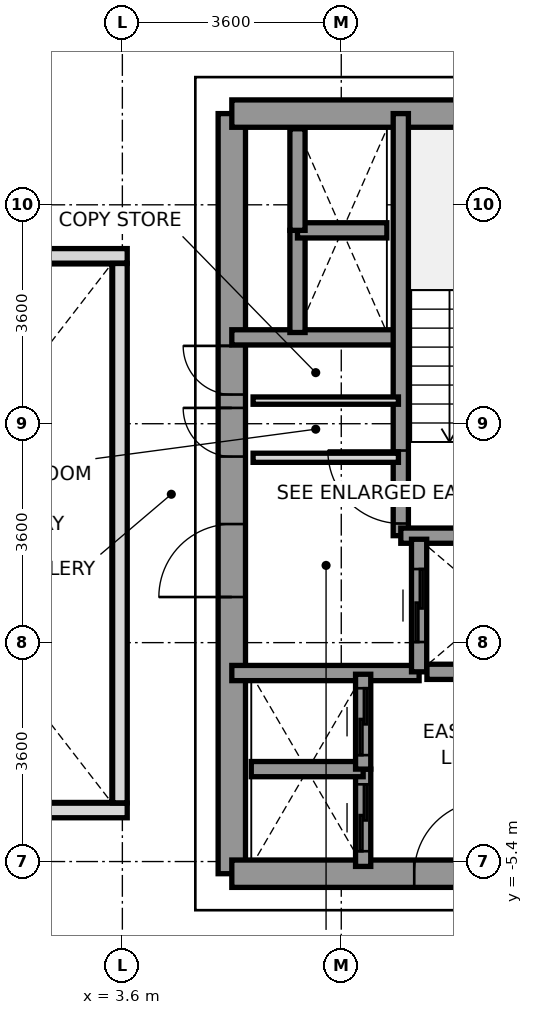
"""IFC4 building model, lengths in metres.
Left out: names, types, materials, properties, quantities, classifications, styles, units other than length and angle.
Written with IfcOpenShell. Run it as: python <this file> out.ifc"""

import sys

from ifc_helpers import new_model, si_unit, direction, frame, frame_2d, origin, place, context, subcontext, project, spatial, rectangle, extrude, source, transform, mapped, element, fill, save


model = new_model("IFC4")
c1 = context("Model", 3, precision=1e-05, world=origin(), true_north=direction((0.0, 1.0)))
c2 = subcontext(c1, "Body", "Model", "MODEL_VIEW")
j1 = project(units=[si_unit("LENGTHUNIT", "METRE"), si_unit("PLANEANGLEUNIT", "RADIAN")], contexts=[c1])
p1 = place(None, origin())
s1 = spatial("IfcSite", under=j1, at=p1, CompositionType="ELEMENT")
p2 = place(p1, origin())
s2 = spatial("IfcBuilding", under=s1, at=p2, CompositionType="ELEMENT")
p3 = place(p2, frame((0.0, 0.0, 124.4)))
s3 = spatial("IfcBuildingStorey", under=s2, at=p3, CompositionType="ELEMENT", Elevation=124.4)
p4 = place(p3, frame((5.4, -5.6, 0.0), z_axis=(0.0, 0.0, 1.0), x_axis=(0.0, 1.0, 0.0)))
e1 = element("IfcWall", 1, at=p4, inside=s3, PredefinedType="SHEAR", context=c2, shape_type="SweptSolid", body=[
    extrude(rectangle(XDim=12.5, YDim=0.45, at=frame_2d((6.25, 0.0))), origin(), (0.0, 0.0, 1.0), 3.2),
])
p5 = place(p4, frame((4.55, 0.0, 0.0)))
e2 = element("IfcOpeningElement", 2, at=p5, cuts=e1, PredefinedType="OPENING", context=c2, shape_type="SweptSolid", body=[
    extrude(rectangle(XDim=1.2, YDim=2.2, at=frame_2d((0.6, 1.1))), frame((0.0, 0.235, 0.0), z_axis=(0.0, -1.0, 0.0), x_axis=(1.0, 0.0, 0.0)), (0.0, 0.0, 1.0), 0.47),
])
p6 = place(p4, frame((6.86, 0.0, 0.0)))
e3 = element("IfcOpeningElement", 3, at=p6, cuts=e1, PredefinedType="OPENING", context=c2, shape_type="SweptSolid", body=[
    extrude(rectangle(XDim=0.8, YDim=2.1, at=frame_2d((0.4, 1.05))), frame((0.0, 0.235, 0.0), z_axis=(0.0, -1.0, 0.0), x_axis=(1.0, 0.0, 0.0)), (0.0, 0.0, 1.0), 0.47),
])
p7 = place(p4, frame((7.88, 0.0, 0.0)))
e4 = element("IfcOpeningElement", 4, at=p7, cuts=e1, PredefinedType="OPENING", context=c2, shape_type="SweptSolid", body=[
    extrude(rectangle(XDim=0.8, YDim=2.1, at=frame_2d((0.4, 1.05))), frame((0.0, 0.235, 0.0), z_axis=(0.0, -1.0, 0.0), x_axis=(1.0, 0.0, 0.0)), (0.0, 0.0, 1.0), 0.47),
])
p8 = place(p3, frame((5.4, 6.9, 0.0), z_axis=(0.0, 0.0, 1.0), x_axis=(1.0, 0.0, 0.0)))
e5 = element("IfcWall", 5, at=p8, inside=s3, PredefinedType="SHEAR", context=c2, shape_type="SweptSolid", body=[
    extrude(rectangle(XDim=5.981, YDim=0.45, at=frame_2d((2.991, 0.0))), origin(), (0.0, 0.0, 1.0), 3.2),
])
p9 = place(p3, frame((5.4, -5.6, 0.0), z_axis=(0.0, 0.0, 1.0), x_axis=(1.0, 0.0, 0.0)))
e6 = element("IfcWall", 6, at=p9, inside=s3, PredefinedType="SHEAR", context=c2, shape_type="SweptSolid", body=[
    extrude(rectangle(XDim=7.8, YDim=0.45, at=frame_2d((3.9, 0.0))), origin(), (0.0, 0.0, 1.0), 3.2),
])
p10 = place(p9, frame((3.0, 0.0, 0.0)))
e7 = element("IfcOpeningElement", 7, at=p10, cuts=e6, PredefinedType="OPENING", context=c2, shape_type="SweptSolid", body=[
    extrude(rectangle(XDim=1.2, YDim=2.2, at=frame_2d((0.6, 1.1))), frame((0.0, 0.235, 0.0), z_axis=(0.0, -1.0, 0.0), x_axis=(1.0, 0.0, 0.0)), (0.0, 0.0, 1.0), 0.47),
])
p11 = place(p9, frame((5.85, 0.0, 0.0)))
e8 = element("IfcOpeningElement", 8, at=p11, cuts=e6, PredefinedType="OPENING", context=c2, shape_type="SweptSolid", body=[
    extrude(rectangle(XDim=0.8, YDim=2.1, at=frame_2d((0.4, 1.05))), frame((0.0, 0.235, 0.0), z_axis=(0.0, -1.0, 0.0), x_axis=(1.0, 0.0, 0.0)), (0.0, 0.0, 1.0), 0.47),
])
p12 = place(p3, frame((5.4, 3.22, 0.0), z_axis=(0.0, 0.0, 1.0), x_axis=(1.0, 0.0, 0.0)))
e9 = element("IfcWall", 9, at=p12, inside=s3, PredefinedType="SOLIDWALL", context=c2, shape_type="SweptSolid", body=[
    extrude(rectangle(XDim=2.78, YDim=0.25, at=frame_2d((1.39, 0.0))), origin(), (0.0, 0.0, 1.0), 3.2),
])
p13 = place(p3, frame((5.4, -2.3, 0.0), z_axis=(0.0, 0.0, 1.0), x_axis=(1.0, 0.0, 0.0)))
e10 = element("IfcWall", 10, at=p13, inside=s3, PredefinedType="SOLIDWALL", context=c2, shape_type="SweptSolid", body=[
    extrude(rectangle(XDim=3.08, YDim=0.25, at=frame_2d((1.54, 0.0))), origin(), (0.0, 0.0, 1.0), 3.2),
])
p14 = place(p3, frame((8.179, -0.041, 0.0), z_axis=(0.0, 0.0, 1.0), x_axis=(0.0, 1.0, 0.0)))
e11 = element("IfcWall", 11, at=p14, inside=s3, PredefinedType="SOLIDWALL", context=c2, shape_type="SweptSolid", body=[
    extrude(rectangle(XDim=6.941, YDim=0.25, at=frame_2d((3.47, 0.0))), origin(), (0.0, 0.0, 1.0), 3.2),
])
p15 = place(p14, frame((0.2, 0.0, 0.0)))
e12 = element("IfcOpeningElement", 12, at=p15, cuts=e11, PredefinedType="OPENING", context=c2, shape_type="SweptSolid", body=[
    extrude(rectangle(XDim=1.2, YDim=2.2, at=frame_2d((0.6, 1.1))), frame((0.0, 0.135, 0.0), z_axis=(0.0, -1.0, 0.0), x_axis=(1.0, 0.0, 0.0)), (0.0, 0.0, 1.0), 0.27),
])
p16 = place(p3, frame((8.179, -0.041, 0.0), z_axis=(0.0, 0.0, 1.0), x_axis=(1.0, 0.0, 0.0)))
e13 = element("IfcWall", 13, at=p16, inside=s3, PredefinedType="SOLIDWALL", context=c2, shape_type="SweptSolid", body=[
    extrude(rectangle(XDim=3.202, YDim=0.25, at=frame_2d((1.601, 0.0))), origin(), (0.0, 0.0, 1.0), 3.2),
])
p17 = place(p3, frame((8.48, -2.28, 0.0), z_axis=(0.0, 0.0, 1.0), x_axis=(0.0, 1.0, 0.0)))
e14 = element("IfcWall", 14, at=p17, inside=s3, PredefinedType="SOLIDWALL", context=c2, shape_type="SweptSolid", body=[
    extrude(rectangle(XDim=2.18, YDim=0.25, at=frame_2d((1.09, 0.0))), origin(), (0.0, 0.0, 1.0), 3.2),
])
p18 = place(p17, frame((0.49, 0.0, 0.0)))
e15 = element("IfcOpeningElement", 15, at=p18, cuts=e14, PredefinedType="OPENING", context=c2, shape_type="SweptSolid", body=[
    extrude(rectangle(XDim=1.2, YDim=2.2, at=frame_2d((0.6, 1.1))), frame((0.0, 0.135, 0.0), z_axis=(0.0, -1.0, 0.0), x_axis=(1.0, 0.0, 0.0)), (0.0, 0.0, 1.0), 0.27),
])
p19 = place(p3, frame((8.609, -2.28, 0.0), z_axis=(0.0, 0.0, 1.0), x_axis=(1.0, 0.0, 0.0)))
e16 = element("IfcWall", 16, at=p19, inside=s3, PredefinedType="SOLIDWALL", context=c2, shape_type="SweptSolid", body=[
    extrude(rectangle(XDim=2.312, YDim=0.25, at=frame_2d((1.156, 0.0))), origin(), (0.0, 0.0, 1.0), 3.2),
])
p20 = place(p3, frame((7.56, -5.48, 0.0), z_axis=(0.0, 0.0, 1.0), x_axis=(0.0, 1.0, 0.0)))
e17 = element("IfcWall", 17, at=p20, inside=s3, PredefinedType="SOLIDWALL", context=c2, shape_type="SweptSolid", body=[
    extrude(rectangle(XDim=1.6, YDim=0.25, at=frame_2d((0.8, 0.0))), origin(), (0.0, 0.0, 1.0), 3.2),
])
p21 = place(p20, frame((0.25, 0.0, 0.0)))
e18 = element("IfcOpeningElement", 18, at=p21, cuts=e17, PredefinedType="OPENING", context=c2, shape_type="SweptSolid", body=[
    extrude(rectangle(XDim=1.1, YDim=2.2, at=frame_2d((0.55, 1.1))), frame((0.0, 0.135, 0.0), z_axis=(0.0, -1.0, 0.0), x_axis=(1.0, 0.0, 0.0)), (0.0, 0.0, 1.0), 0.27),
])
p22 = place(p3, frame((5.72, -3.88, 0.0), z_axis=(0.0, 0.0, 1.0), x_axis=(1.0, 0.0, 0.0)))
e19 = element("IfcWall", 19, at=p22, inside=s3, PredefinedType="SOLIDWALL", context=c2, shape_type="SweptSolid", body=[
    extrude(rectangle(XDim=1.84, YDim=0.25, at=frame_2d((0.92, 0.0))), origin(), (0.0, 0.0, 1.0), 3.2),
])
p23 = place(p3, frame((7.56, -3.88, 0.0), z_axis=(0.0, 0.0, 1.0), x_axis=(0.0, 1.0, 0.0)))
e20 = element("IfcWall", 20, at=p23, inside=s3, PredefinedType="SOLIDWALL", context=c2, shape_type="SweptSolid", body=[
    extrude(rectangle(XDim=1.56, YDim=0.25, at=frame_2d((0.78, 0.0))), origin(), (0.0, 0.0, 1.0), 3.2),
])
p24 = place(p23, frame((0.23, 0.0, 0.0)))
e21 = element("IfcOpeningElement", 21, at=p24, cuts=e20, PredefinedType="OPENING", context=c2, shape_type="SweptSolid", body=[
    extrude(rectangle(XDim=1.1, YDim=2.2, at=frame_2d((0.55, 1.1))), frame((0.0, 0.135, 0.0), z_axis=(0.0, -1.0, 0.0), x_axis=(1.0, 0.0, 0.0)), (0.0, 0.0, 1.0), 0.27),
])
p25 = place(p3, frame((6.48, 3.3, 0.0), z_axis=(0.0, 0.0, 1.0), x_axis=(0.0, 1.0, 0.0)))
e22 = element("IfcWall", 22, at=p25, inside=s3, PredefinedType="SOLIDWALL", context=c2, shape_type="SweptSolid", body=[
    extrude(rectangle(XDim=1.68, YDim=0.25, at=frame_2d((0.84, 0.0))), origin(), (0.0, 0.0, 1.0), 3.2),
])
p26 = place(p3, frame((6.48, 4.98, 0.0), z_axis=(0.0, 0.0, 1.0), x_axis=(1.0, 0.0, 0.0)))
e23 = element("IfcWall", 23, at=p26, inside=s3, PredefinedType="SOLIDWALL", context=c2, shape_type="SweptSolid", body=[
    extrude(rectangle(XDim=1.47, YDim=0.25, at=frame_2d((0.735, 0.0))), origin(), (0.0, 0.0, 1.0), 3.2),
])
p27 = place(p3, frame((6.48, 4.98, 0.0), z_axis=(0.0, 0.0, 1.0), x_axis=(0.0, 1.0, 0.0)))
e24 = element("IfcWall", 24, at=p27, inside=s3, PredefinedType="SOLIDWALL", context=c2, shape_type="SweptSolid", body=[
    extrude(rectangle(XDim=1.67, YDim=0.25, at=frame_2d((0.835, 0.0))), origin(), (0.0, 0.0, 1.0), 3.2),
])
p28 = place(p3, frame((5.75, 1.24, 0.0), z_axis=(0.0, 0.0, 1.0), x_axis=(1.0, 0.0, 0.0)))
e25 = element("IfcWall", 25, at=p28, inside=s3, PredefinedType="PARTITIONING", context=c2, shape_type="SweptSolid", body=[
    extrude(rectangle(XDim=2.39, YDim=0.15, at=frame_2d((1.195, 0.0))), origin(), (0.0, 0.0, 1.0), 2.3),
])
p29 = place(p3, frame((5.75, 2.18, 0.0), z_axis=(0.0, 0.0, 1.0), x_axis=(1.0, 0.0, 0.0)))
e26 = element("IfcWall", 26, at=p29, inside=s3, PredefinedType="PARTITIONING", context=c2, shape_type="SweptSolid", body=[
    extrude(rectangle(XDim=2.39, YDim=0.12, at=frame_2d((1.195, 0.0))), origin(), (0.0, 0.0, 1.0), 2.3),
])
for number, where, z_axis, x_axis in (
    (27, (-3.68, -4.56, 0.0), (0.0, 0.0, 1.0), (1.0, 0.0, 0.0)),
    (28, (-3.68, 4.56, 0.0), (0.0, 0.0, 1.0), (1.0, 0.0, 0.0)),
):
    element("IfcWall", number, at=place(p3, frame(where, z_axis=z_axis, x_axis=x_axis)), inside=s3, PredefinedType="PARAPET", context=c2, shape_type="SweptSolid", body=[
        extrude(rectangle(XDim=7.36, YDim=0.24, at=frame_2d((3.68, 0.0))), origin(), (0.0, 0.0, 1.0), 1.15),
    ])
p30 = place(p3, frame((3.56, -4.435, 0.0), z_axis=(0.0, 0.0, 1.0), x_axis=(0.0, 1.0, 0.0)))
e29 = element("IfcWall", 29, at=p30, inside=s3, PredefinedType="PARAPET", context=c2, shape_type="SweptSolid", body=[
    extrude(rectangle(XDim=8.87, YDim=0.24, at=frame_2d((4.435, 0.0))), origin(), (0.0, 0.0, 1.0), 1.15),
])
m1 = source(origin(), c2, "Body", "SweptSolid", [
    extrude(rectangle(XDim=1.2, YDim=2.2, at=frame_2d((0.6, 1.1))), frame((0.0, 0.025, 0.0), z_axis=(0.0, -1.0, 0.0), x_axis=(1.0, 0.0, 0.0)), (0.0, 0.0, 1.0), 0.05),
])
p31 = place(p15, origin())
e30 = element("IfcDoor", 30, at=p31, inside=s3, OperationType="SINGLE_SWING_RIGHT", PredefinedType="DOOR", context=c2, shape_type="MappedRepresentation", body=[
    mapped(m1, transform((0.0, 0.0, 0.0), x_axis=(1.0, 0.0, 0.0), y_axis=(0.0, 1.0, 0.0), z_axis=(0.0, 0.0, 1.0), scale=1.0)),
])
fill(e12, e30)
p32 = place(p5, origin())
e31 = element("IfcDoor", 31, at=p32, inside=s3, OperationType="SINGLE_SWING_LEFT", PredefinedType="DOOR", context=c2, shape_type="MappedRepresentation", body=[
    mapped(m1, transform((0.0, 0.0, 0.0), x_axis=(1.0, 0.0, 0.0), y_axis=(0.0, 1.0, 0.0), z_axis=(0.0, 0.0, 1.0), scale=1.0)),
])
fill(e2, e31)
p33 = place(p10, origin())
e32 = element("IfcDoor", 32, at=p33, inside=s3, OperationType="SINGLE_SWING_RIGHT", PredefinedType="DOOR", context=c2, shape_type="MappedRepresentation", body=[
    mapped(m1, transform((0.0, 0.0, 0.0), x_axis=(1.0, 0.0, 0.0), y_axis=(0.0, 1.0, 0.0), z_axis=(0.0, 0.0, 1.0), scale=1.0)),
])
fill(e7, e32)
m2 = source(origin(), c2, "Body", "SweptSolid", [
    extrude(rectangle(XDim=0.8, YDim=2.1, at=frame_2d((0.4, 1.05))), frame((0.0, 0.025, 0.0), z_axis=(0.0, -1.0, 0.0), x_axis=(1.0, 0.0, 0.0)), (0.0, 0.0, 1.0), 0.05),
])
p34 = place(p6, origin())
e33 = element("IfcDoor", 33, at=p34, inside=s3, OperationType="SINGLE_SWING_RIGHT", PredefinedType="DOOR", context=c2, shape_type="MappedRepresentation", body=[
    mapped(m2, transform((0.0, 0.0, 0.0), x_axis=(1.0, 0.0, 0.0), y_axis=(0.0, 1.0, 0.0), z_axis=(0.0, 0.0, 1.0), scale=1.0)),
])
fill(e3, e33)
p35 = place(p7, origin())
e34 = element("IfcDoor", 34, at=p35, inside=s3, OperationType="SINGLE_SWING_RIGHT", PredefinedType="DOOR", context=c2, shape_type="MappedRepresentation", body=[
    mapped(m2, transform((0.0, 0.0, 0.0), x_axis=(1.0, 0.0, 0.0), y_axis=(0.0, 1.0, 0.0), z_axis=(0.0, 0.0, 1.0), scale=1.0)),
])
fill(e4, e34)
p36 = place(p18, origin())
e35 = element("IfcDoor", 35, at=p36, inside=s3, OperationType="SLIDING_TO_RIGHT", PredefinedType="DOOR", context=c2, shape_type="MappedRepresentation", body=[
    mapped(m1, transform((0.0, 0.0, 0.0), x_axis=(1.0, 0.0, 0.0), y_axis=(0.0, 1.0, 0.0), z_axis=(0.0, 0.0, 1.0), scale=1.0)),
])
fill(e15, e35)
m3 = source(origin(), c2, "Body", "SweptSolid", [
    extrude(rectangle(XDim=1.1, YDim=2.2, at=frame_2d((0.55, 1.1))), frame((0.0, 0.025, 0.0), z_axis=(0.0, -1.0, 0.0), x_axis=(1.0, 0.0, 0.0)), (0.0, 0.0, 1.0), 0.05),
])
p37 = place(p21, origin())
e36 = element("IfcDoor", 36, at=p37, inside=s3, OperationType="SLIDING_TO_LEFT", PredefinedType="DOOR", context=c2, shape_type="MappedRepresentation", body=[
    mapped(m3, transform((0.0, 0.0, 0.0), x_axis=(1.0, 0.0, 0.0), y_axis=(0.0, 1.0, 0.0), z_axis=(0.0, 0.0, 1.0), scale=1.0)),
])
fill(e18, e36)
p38 = place(p24, origin())
e37 = element("IfcDoor", 37, at=p38, inside=s3, OperationType="SLIDING_TO_LEFT", PredefinedType="DOOR", context=c2, shape_type="MappedRepresentation", body=[
    mapped(m3, transform((0.0, 0.0, 0.0), x_axis=(1.0, 0.0, 0.0), y_axis=(0.0, 1.0, 0.0), z_axis=(0.0, 0.0, 1.0), scale=1.0)),
])
fill(e21, e37)
save(model, sys.argv[1])
